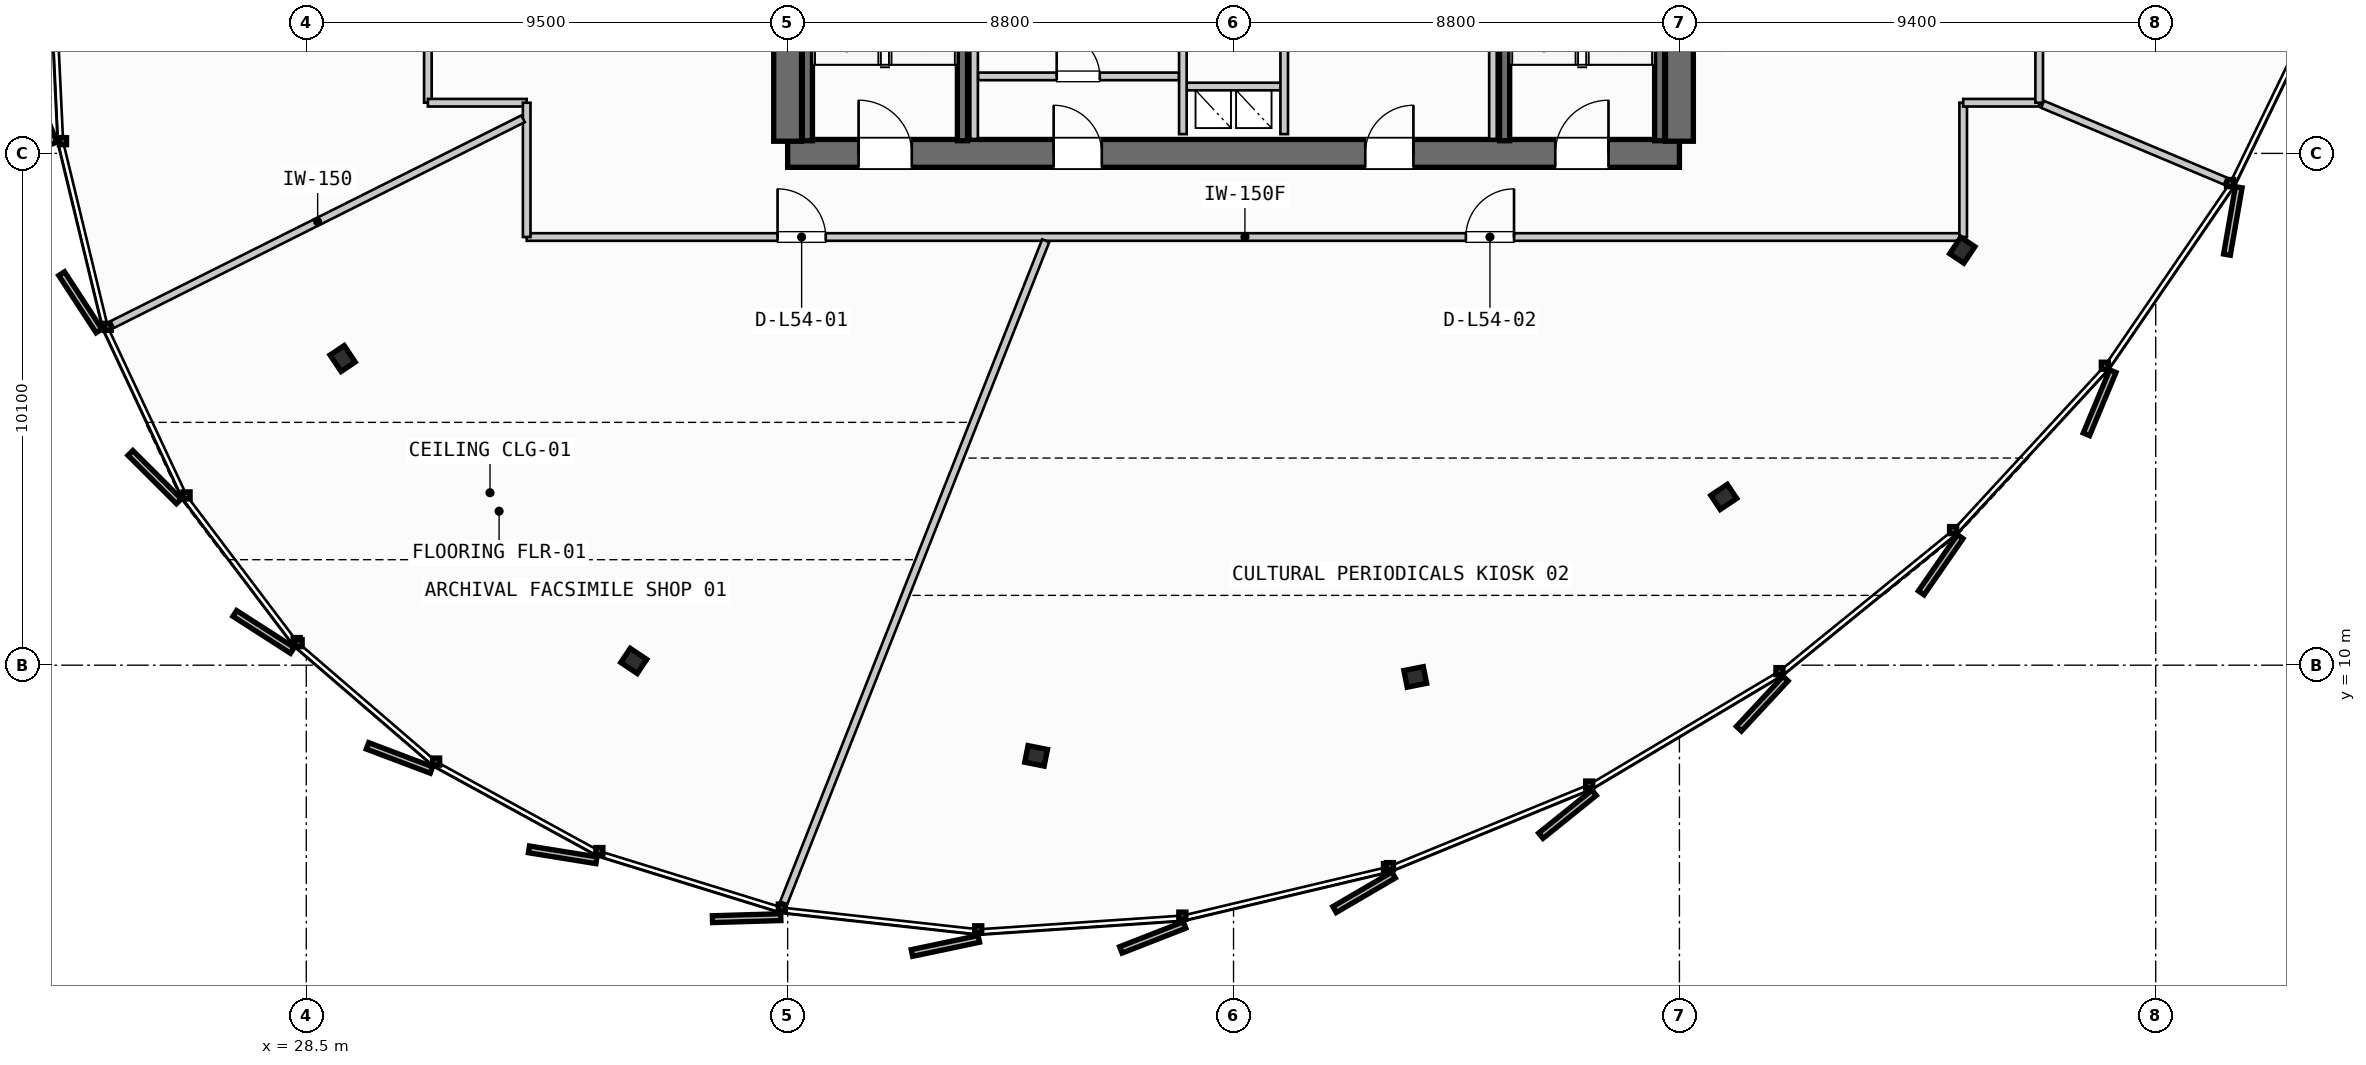
"""IFC4 building model, lengths in metres.
Left out: names, types, materials, properties, quantities, classifications, styles, units other than length and angle.
Written with IfcOpenShell. Run it as: python <this file> out.ifc"""

import sys

from ifc_helpers import new_model, si_unit, direction, frame, frame_2d, origin, origin_2d, place, context, subcontext, project, spatial, rectangle, i_section, extrude, source, transform, mapped, element, fill, save


model = new_model("IFC4")
c1 = context("Model", 3, precision=1e-05, world=origin(), true_north=direction((0.0, 1.0)))
c2 = subcontext(c1, "Body", "Model", "MODEL_VIEW")
j1 = project(units=[si_unit("LENGTHUNIT", "METRE"), si_unit("PLANEANGLEUNIT", "RADIAN")], contexts=[c1])
p1 = place(None, origin())
s1 = spatial("IfcSite", under=j1, at=p1, CompositionType="ELEMENT")
p2 = place(p1, origin())
s2 = spatial("IfcBuilding", under=s1, at=p2, CompositionType="ELEMENT")
p3 = place(p2, frame((0.0, 0.0, 207.9)))
s3 = spatial("IfcBuildingStorey", under=s2, at=p3, CompositionType="ELEMENT", Elevation=207.9)
p4 = place(p3, frame((38.0, 20.1, 0.0), z_axis=(0.0, 0.0, 1.0), x_axis=(1.0, 0.0, 0.0)))
e1 = element("IfcWall", 1, at=p4, inside=s3, PredefinedType="SHEAR", context=c2, shape_type="SweptSolid", body=[
    extrude(rectangle(XDim=17.6, YDim=0.55, at=frame_2d((8.8, 0.0))), origin(), (0.0, 0.0, 1.0), 3.26),
])
p5 = place(p4, frame((1.4, 0.0, 0.0)))
e2 = element("IfcOpeningElement", 2, at=p5, cuts=e1, PredefinedType="OPENING", context=c2, shape_type="SweptSolid", body=[
    extrude(rectangle(XDim=1.05, YDim=2.15, at=frame_2d((0.525, 1.075))), frame((0.0, 0.285, 0.0), z_axis=(0.0, -1.0, 0.0), x_axis=(1.0, 0.0, 0.0)), (0.0, 0.0, 1.0), 0.57),
])
p6 = place(p4, frame((15.15, 0.0, 0.0)))
e3 = element("IfcOpeningElement", 3, at=p6, cuts=e1, PredefinedType="OPENING", context=c2, shape_type="SweptSolid", body=[
    extrude(rectangle(XDim=1.05, YDim=2.15, at=frame_2d((0.525, 1.075))), frame((0.0, 0.285, 0.0), z_axis=(0.0, -1.0, 0.0), x_axis=(1.0, 0.0, 0.0)), (0.0, 0.0, 1.0), 0.57),
])
p7 = place(p4, frame((5.25, 0.0, 0.0)))
e4 = element("IfcOpeningElement", 4, at=p7, cuts=e1, PredefinedType="OPENING", context=c2, shape_type="SweptSolid", body=[
    extrude(rectangle(XDim=0.95, YDim=2.15, at=frame_2d((0.475, 1.075))), frame((0.0, 0.285, 0.0), z_axis=(0.0, -1.0, 0.0), x_axis=(1.0, 0.0, 0.0)), (0.0, 0.0, 1.0), 0.57),
])
p8 = place(p4, frame((11.4, 0.0, 0.0)))
e5 = element("IfcOpeningElement", 5, at=p8, cuts=e1, PredefinedType="OPENING", context=c2, shape_type="SweptSolid", body=[
    extrude(rectangle(XDim=0.95, YDim=2.15, at=frame_2d((0.475, 1.075))), frame((0.0, 0.285, 0.0), z_axis=(0.0, -1.0, 0.0), x_axis=(1.0, 0.0, 0.0)), (0.0, 0.0, 1.0), 0.57),
])
p9 = place(p3, frame((38.0, 35.26, 0.0), z_axis=(0.0, 0.0, 1.0), x_axis=(0.0, -1.0, 0.0)))
e6 = element("IfcWall", 6, at=p9, inside=s3, PredefinedType="SHEAR", context=c2, shape_type="SweptSolid", body=[
    extrude(rectangle(XDim=14.92, YDim=0.55, at=frame_2d((7.46, 0.0))), origin(), (0.0, 0.0, 1.0), 3.26),
])
p10 = place(p9, frame((5.21, 0.0, 0.0)))
e7 = element("IfcOpeningElement", 7, at=p10, cuts=e6, PredefinedType="OPENING", context=c2, shape_type="SweptSolid", body=[
    extrude(rectangle(XDim=1.1, YDim=2.2, at=frame_2d((0.55, 1.1))), frame((0.0, 0.285, 0.0), z_axis=(0.0, -1.0, 0.0), x_axis=(1.0, 0.0, 0.0)), (0.0, 0.0, 1.0), 0.57),
])
p11 = place(p3, frame((55.6, 20.34, 0.0), z_axis=(0.0, 0.0, 1.0), x_axis=(0.0, 1.0, 0.0)))
e8 = element("IfcWall", 8, at=p11, inside=s3, PredefinedType="SHEAR", context=c2, shape_type="SweptSolid", body=[
    extrude(rectangle(XDim=14.92, YDim=0.55, at=frame_2d((7.46, 0.0))), origin(), (0.0, 0.0, 1.0), 3.26),
])
p12 = place(p11, frame((12.71, 0.0, 0.0)))
e9 = element("IfcOpeningElement", 9, at=p12, cuts=e8, PredefinedType="OPENING", context=c2, shape_type="SweptSolid", body=[
    extrude(rectangle(XDim=1.05, YDim=2.15, at=frame_2d((0.525, 1.075))), frame((0.0, 0.285, 0.0), z_axis=(0.0, -1.0, 0.0), x_axis=(1.0, 0.0, 0.0)), (0.0, 0.0, 1.0), 0.57),
])
p13 = place(p11, frame((8.61, 0.0, 0.0)))
e10 = element("IfcOpeningElement", 10, at=p13, cuts=e8, PredefinedType="OPENING", context=c2, shape_type="SweptSolid", body=[
    extrude(rectangle(XDim=1.1, YDim=2.2, at=frame_2d((0.55, 1.1))), frame((0.0, 0.285, 0.0), z_axis=(0.0, -1.0, 0.0), x_axis=(1.0, 0.0, 0.0)), (0.0, 0.0, 1.0), 0.57),
])
m1 = source(origin(), c2, "Body", "SweptSolid", [
    extrude(i_section(OverallWidth=0.391, OverallDepth=0.335, WebThickness=0.023, FlangeThickness=0.034, FilletRadius=0.015, at=origin_2d()), origin(), (0.0, 0.0, 1.0), 3.26),
])
for number, where, z_axis, x_axis in (
    (11, (29.218, 16.052, 0.0), (0.0, 0.0, 1.0), (-0.831, -0.556, 0.0)),
    (12, (34.963, 10.084, 0.0), (0.0, 0.0, 1.0), (-0.556, -0.831, 0.0)),
    (13, (42.904, 8.211, 0.0), (0.0, 0.0, 1.0), (-0.195, -0.981, 0.0)),
    (14, (50.387, 9.769, 0.0), (0.0, 0.0, 1.0), (0.195, -0.981, 0.0)),
    (15, (56.475, 13.321, 0.0), (0.0, 0.0, 1.0), (0.556, -0.831, 0.0)),
    (16, (61.183, 18.19, 0.0), (0.0, 0.0, 1.0), (0.831, -0.556, 0.0)),
):
    element("IfcColumn", number, at=place(p3, frame(where, z_axis=z_axis, x_axis=x_axis)), inside=s3, PredefinedType="COLUMN", context=c2, shape_type="MappedRepresentation", body=[
        mapped(m1, transform((0.0, 0.0, 0.0), scale=1.0)),
    ])
for number, where, z_axis, x_axis in (
    (17, (41.45, 27.7, 0.0), (0.0, 0.0, 1.0), (0.0, -1.0, 0.0)),
    (18, (38.39, 20.35, 0.0), (0.0, 0.0, 1.0), (0.0, 1.0, 0.0)),
    (19, (55.21, 27.7, 0.0), (0.0, 0.0, 1.0), (0.0, -1.0, 0.0)),
    (20, (52.15, 20.35, 0.0), (0.0, 0.0, 1.0), (0.0, 1.0, 0.0)),
):
    element("IfcWall", number, at=place(p3, frame(where, z_axis=z_axis, x_axis=x_axis)), inside=s3, PredefinedType="SHEAR", context=c2, shape_type="SweptSolid", body=[
        extrude(rectangle(XDim=7.35, YDim=0.2, at=frame_2d((3.675, 0.0))), origin(), (0.0, 0.0, 1.0), 3.26),
    ])
p14 = place(p3, frame((45.8, 21.42, 0.0), z_axis=(0.0, 0.0, 1.0), x_axis=(1.0, 0.0, 0.0)))
e21 = element("IfcWall", 21, at=p14, inside=s3, PredefinedType="PARTITIONING", context=c2, shape_type="SweptSolid", body=[
    extrude(rectangle(XDim=2.0, YDim=0.15, at=frame_2d((1.0, 0.0))), origin(), (0.0, 0.0, 1.0), 2.455),
])
for number, where, z_axis, x_axis in (
    (22, (45.8, 20.48, 0.0), (0.0, 0.0, 1.0), (0.0, 1.0, 0.0)),
    (23, (47.8, 20.48, 0.0), (0.0, 0.0, 1.0), (0.0, 1.0, 0.0)),
):
    element("IfcWall", number, at=place(p3, frame(where, z_axis=z_axis, x_axis=x_axis)), inside=s3, PredefinedType="PARTITIONING", context=c2, shape_type="SweptSolid", body=[
        extrude(rectangle(XDim=2.24, YDim=0.15, at=frame_2d((1.12, 0.0))), origin(), (0.0, 0.0, 1.0), 2.455),
    ])
for number, where, z_axis, x_axis in (
    (24, (41.68, 20.385, 0.0), (0.0, 0.0, 1.0), (0.0, 1.0, 0.0)),
    (25, (51.92, 20.385, 0.0), (0.0, 0.0, 1.0), (0.0, 1.0, 0.0)),
):
    element("IfcWall", number, at=place(p3, frame(where, z_axis=z_axis, x_axis=x_axis)), inside=s3, PredefinedType="PARTITIONING", context=c2, shape_type="SweptSolid", body=[
        extrude(rectangle(XDim=2.345, YDim=0.15, at=frame_2d((1.172, 0.0))), origin(), (0.0, 0.0, 1.0), 2.455),
    ])
p15 = place(p3, frame((41.76, 21.62, 0.0), z_axis=(0.0, 0.0, 1.0), x_axis=(1.0, 0.0, 0.0)))
e26 = element("IfcWall", 26, at=p15, inside=s3, PredefinedType="PARTITIONING", context=c2, shape_type="SweptSolid", body=[
    extrude(rectangle(XDim=3.96, YDim=0.15, at=frame_2d((1.98, 0.0))), origin(), (0.0, 0.0, 1.0), 2.455),
])
p16 = place(p15, frame((1.55, 0.0, 0.0)))
e27 = element("IfcOpeningElement", 27, at=p16, cuts=e26, PredefinedType="OPENING", context=c2, shape_type="SweptSolid", body=[
    extrude(rectangle(XDim=0.85, YDim=2.15, at=frame_2d((0.425, 1.075))), frame((0.0, 0.085, 0.0), z_axis=(0.0, -1.0, 0.0), x_axis=(1.0, 0.0, 0.0)), (0.0, 0.0, 1.0), 0.17),
])
p17 = place(p3, frame((32.85, 18.45, 0.0), z_axis=(0.0, 0.0, 1.0), x_axis=(1.0, 0.0, 0.0)))
e28 = element("IfcWall", 28, at=p17, inside=s3, PredefinedType="PARTITIONING", context=c2, shape_type="SweptSolid", body=[
    extrude(rectangle(XDim=28.35, YDim=0.15, at=frame_2d((14.175, 0.0))), origin(), (0.0, 0.0, 1.0), 2.455),
])
p18 = place(p17, frame((4.951, 0.0, 0.0)))
e29 = element("IfcOpeningElement", 29, at=p18, cuts=e28, PredefinedType="OPENING", context=c2, shape_type="SweptSolid", body=[
    extrude(rectangle(XDim=0.95, YDim=2.15, at=frame_2d((0.475, 1.075))), frame((0.0, 0.085, 0.0), z_axis=(0.0, -1.0, 0.0), x_axis=(1.0, 0.0, 0.0)), (0.0, 0.0, 1.0), 0.17),
])
p19 = place(p17, frame((18.536, 0.0, 0.0)))
e30 = element("IfcOpeningElement", 30, at=p19, cuts=e28, PredefinedType="OPENING", context=c2, shape_type="SweptSolid", body=[
    extrude(rectangle(XDim=0.95, YDim=2.15, at=frame_2d((0.475, 1.075))), frame((0.0, 0.085, 0.0), z_axis=(0.0, -1.0, 0.0), x_axis=(1.0, 0.0, 0.0)), (0.0, 0.0, 1.0), 0.17),
])
p20 = place(p3, frame((61.2, 18.45, 0.0), z_axis=(0.0, 0.0, 1.0), x_axis=(0.0, 1.0, 0.0)))
e31 = element("IfcWall", 31, at=p20, inside=s3, PredefinedType="PARTITIONING", context=c2, shape_type="SweptSolid", body=[
    extrude(rectangle(XDim=2.65, YDim=0.15, at=frame_2d((1.325, 0.0))), origin(), (0.0, 0.0, 1.0), 2.455),
])
p21 = place(p3, frame((61.2, 21.1, 0.0), z_axis=(0.0, 0.0, 1.0), x_axis=(1.0, 0.0, 0.0)))
e32 = element("IfcWall", 32, at=p21, inside=s3, PredefinedType="PARTITIONING", context=c2, shape_type="SweptSolid", body=[
    extrude(rectangle(XDim=1.5, YDim=0.15, at=frame_2d((0.75, 0.0))), origin(), (0.0, 0.0, 1.0), 2.455),
])
for number, where, z_axis, x_axis in (
    (33, (62.7, 21.1, 0.0), (0.0, 0.0, 1.0), (0.0, 1.0, 0.0)),
    (34, (30.9, 22.8, 0.0), (0.0, 0.0, 1.0), (0.0, -1.0, 0.0)),
):
    element("IfcWall", number, at=place(p3, frame(where, z_axis=z_axis, x_axis=x_axis)), inside=s3, PredefinedType="PARTITIONING", context=c2, shape_type="SweptSolid", body=[
        extrude(rectangle(XDim=1.7, YDim=0.15, at=frame_2d((0.85, 0.0))), origin(), (0.0, 0.0, 1.0), 2.455),
    ])
p22 = place(p3, frame((30.9, 21.1, 0.0), z_axis=(0.0, 0.0, 1.0), x_axis=(1.0, 0.0, 0.0)))
e35 = element("IfcWall", 35, at=p22, inside=s3, PredefinedType="PARTITIONING", context=c2, shape_type="SweptSolid", body=[
    extrude(rectangle(XDim=1.95, YDim=0.15, at=frame_2d((0.975, 0.0))), origin(), (0.0, 0.0, 1.0), 2.455),
])
p23 = place(p3, frame((32.85, 21.1, 0.0), z_axis=(0.0, 0.0, 1.0), x_axis=(0.0, -1.0, 0.0)))
e36 = element("IfcWall", 36, at=p23, inside=s3, PredefinedType="PARTITIONING", context=c2, shape_type="SweptSolid", body=[
    extrude(rectangle(XDim=2.65, YDim=0.15, at=frame_2d((1.325, 0.0))), origin(), (0.0, 0.0, 1.0), 2.455),
])
p24 = place(p3, frame((32.779, 20.783, 0.0), z_axis=(0.0, 0.0, 1.0), x_axis=(-0.894120064927, -0.447827321068, 0.0)))
e37 = element("IfcWall", 37, at=p24, inside=s3, PredefinedType="PARTITIONING", context=c2, shape_type="SweptSolid", body=[
    extrude(rectangle(XDim=9.068, YDim=0.15, at=frame_2d((4.534, 0.0))), origin(), (0.0, 0.0, 1.0), 2.455),
])
p25 = place(p3, frame((43.093, 18.375, 0.0), z_axis=(0.0, 0.0, 1.0), x_axis=(-0.367931094087, -0.929853058286, 0.0)))
e38 = element("IfcWall", 38, at=p25, inside=s3, PredefinedType="PARTITIONING", context=c2, shape_type="SweptSolid", body=[
    extrude(rectangle(XDim=14.051, YDim=0.15, at=frame_2d((7.026, 0.0))), origin(), (0.0, 0.0, 1.0), 2.455),
])
p26 = place(p3, frame((62.766, 21.069, 0.0), z_axis=(0.0, 0.0, 1.0), x_axis=(0.922014169655, -0.387156132529, 0.0)))
e39 = element("IfcWall", 39, at=p26, inside=s3, PredefinedType="PARTITIONING", context=c2, shape_type="SweptSolid", body=[
    extrude(rectangle(XDim=3.914, YDim=0.15, at=frame_2d((1.957, 0.0))), origin(), (0.0, 0.0, 1.0), 2.455),
])
m2 = source(origin(), c2, "Body", "SweptSolid", [
    extrude(rectangle(XDim=1.05, YDim=2.15, at=frame_2d((0.525, 1.075))), frame((0.0, 0.025, 0.0), z_axis=(0.0, -1.0, 0.0), x_axis=(1.0, 0.0, 0.0)), (0.0, 0.0, 1.0), 0.05),
])
p27 = place(p5, origin())
e40 = element("IfcDoor", 40, at=p27, inside=s3, OperationType="SINGLE_SWING_LEFT", PredefinedType="DOOR", context=c2, shape_type="MappedRepresentation", body=[
    mapped(m2, transform((0.0, 0.0, 0.0), scale=1.0)),
])
fill(e2, e40)
p28 = place(p6, origin())
e41 = element("IfcDoor", 41, at=p28, inside=s3, OperationType="SINGLE_SWING_RIGHT", PredefinedType="DOOR", context=c2, shape_type="MappedRepresentation", body=[
    mapped(m2, transform((0.0, 0.0, 0.0), scale=1.0)),
])
fill(e3, e41)
m3 = source(origin(), c2, "Body", "SweptSolid", [
    extrude(rectangle(XDim=0.95, YDim=2.15, at=frame_2d((0.475, 1.075))), frame((0.0, 0.025, 0.0), z_axis=(0.0, -1.0, 0.0), x_axis=(1.0, 0.0, 0.0)), (0.0, 0.0, 1.0), 0.05),
])
p29 = place(p7, origin())
e42 = element("IfcDoor", 42, at=p29, inside=s3, OperationType="SINGLE_SWING_LEFT", PredefinedType="DOOR", context=c2, shape_type="MappedRepresentation", body=[
    mapped(m3, transform((0.0, 0.0, 0.0), scale=1.0)),
])
fill(e4, e42)
p30 = place(p8, origin())
e43 = element("IfcDoor", 43, at=p30, inside=s3, OperationType="SINGLE_SWING_RIGHT", PredefinedType="DOOR", context=c2, shape_type="MappedRepresentation", body=[
    mapped(m3, transform((0.0, 0.0, 0.0), scale=1.0)),
])
fill(e5, e43)
m4 = source(origin(), c2, "Body", "SweptSolid", [
    extrude(rectangle(XDim=0.85, YDim=2.15, at=frame_2d((0.425, 1.075))), frame((0.0, 0.025, 0.0), z_axis=(0.0, -1.0, 0.0), x_axis=(1.0, 0.0, 0.0)), (0.0, 0.0, 1.0), 0.05),
])
p31 = place(p16, origin())
e44 = element("IfcDoor", 44, at=p31, inside=s3, OperationType="SINGLE_SWING_LEFT", PredefinedType="DOOR", context=c2, shape_type="MappedRepresentation", body=[
    mapped(m4, transform((0.0, 0.0, 0.0), scale=1.0)),
])
fill(e27, e44)
p32 = place(p18, origin())
e45 = element("IfcDoor", 45, at=p32, inside=s3, OperationType="SINGLE_SWING_LEFT", PredefinedType="DOOR", context=c2, shape_type="MappedRepresentation", body=[
    mapped(m3, transform((0.0, 0.0, 0.0), scale=1.0)),
])
fill(e29, e45)
p33 = place(p19, origin())
e46 = element("IfcDoor", 46, at=p33, inside=s3, OperationType="SINGLE_SWING_RIGHT", PredefinedType="DOOR", context=c2, shape_type="MappedRepresentation", body=[
    mapped(m3, transform((0.0, 0.0, 0.0), scale=1.0)),
])
fill(e30, e46)
save(model, sys.argv[1])
